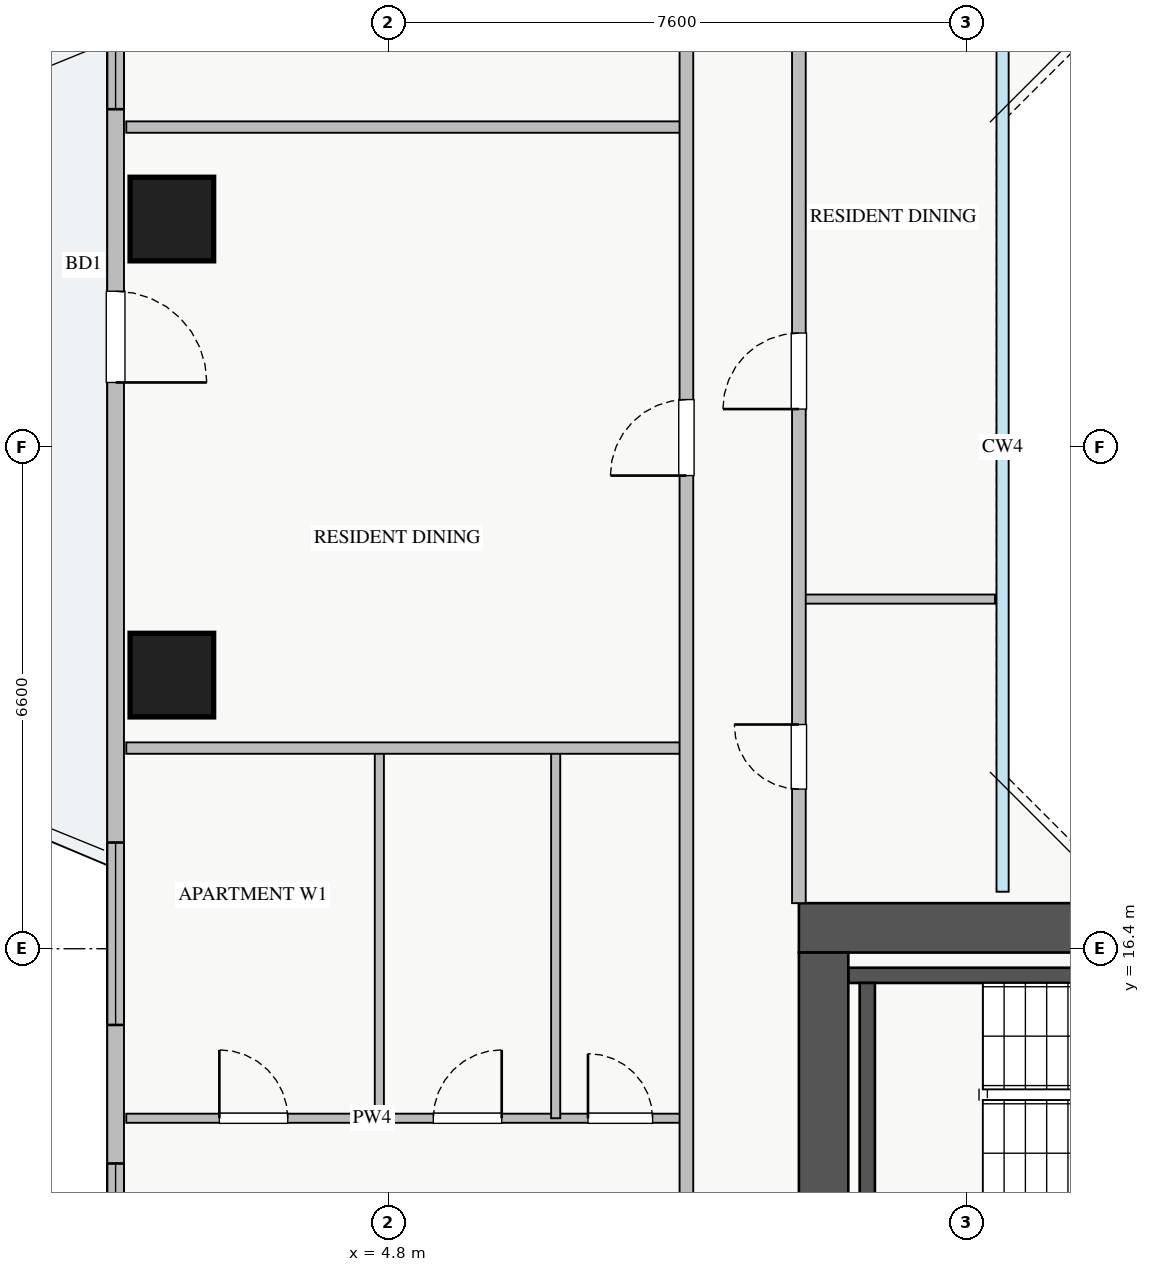
"""IFC4 building model, lengths in metres.
Left out: names, types, materials, properties, quantities, classifications, styles, units other than length and angle.
Written with IfcOpenShell. Run it as: python <this file> out.ifc"""

import sys

from ifc_helpers import new_model, si_unit, direction, frame, frame_2d, origin, origin_2d, place, context, subcontext, project, spatial, rectangle, extrude, source, transform, mapped, element, fill, save


model = new_model("IFC4")
c1 = context("Model", 3, precision=1e-05, world=origin(), true_north=direction((0.0, 1.0)))
c2 = subcontext(c1, "Body", "Model", "MODEL_VIEW")
j1 = project(units=[si_unit("LENGTHUNIT", "METRE"), si_unit("PLANEANGLEUNIT", "RADIAN")], contexts=[c1])
p1 = place(None, origin())
s1 = spatial("IfcSite", under=j1, at=p1, CompositionType="ELEMENT")
p2 = place(p1, origin())
s2 = spatial("IfcBuilding", under=s1, at=p2, CompositionType="ELEMENT")
p3 = place(p2, frame((0.0, 0.0, 126.25)))
s3 = spatial("IfcBuildingStorey", under=s2, at=p3, CompositionType="ELEMENT", Elevation=126.25)
p4 = place(p3, frame((10.85, 16.05, 0.0), z_axis=(0.0, 0.0, 1.0), x_axis=(1.0, 0.0, 0.0)))
e1 = element("IfcWall", 1, at=p4, inside=s3, PredefinedType="SHEAR", context=c2, shape_type="SweptSolid", body=[
    extrude(rectangle(XDim=7.3, YDim=0.2, at=frame_2d((3.65, 0.0))), origin(), (0.0, 0.0, 1.0), 3.25),
])
p5 = place(p3, frame((11.1, 13.01, 0.0), z_axis=(0.0, 0.0, 1.0), x_axis=(0.0, 1.0, 0.0)))
e2 = element("IfcWall", 2, at=p5, inside=s3, PredefinedType="SHEAR", context=c2, shape_type="SweptSolid", body=[
    extrude(rectangle(XDim=2.94, YDim=0.2, at=frame_2d((1.47, 0.0))), origin(), (0.0, 0.0, 1.0), 3.25),
])
p6 = place(p3, frame((10.2, 16.675, 0.0), z_axis=(0.0, 0.0, 1.0), x_axis=(1.0, 0.0, 0.0)))
e3 = element("IfcWall", 3, at=p6, inside=s3, PredefinedType="SHEAR", context=c2, shape_type="SweptSolid", body=[
    extrude(rectangle(XDim=17.6, YDim=0.65, at=frame_2d((8.8, 0.0))), origin(), (0.0, 0.0, 1.0), 3.25),
])
p7 = place(p3, frame((10.525, 10.45, 0.0), z_axis=(0.0, 0.0, 1.0), x_axis=(0.0, 1.0, 0.0)))
e4 = element("IfcWall", 4, at=p7, inside=s3, PredefinedType="SHEAR", context=c2, shape_type="SweptSolid", body=[
    extrude(rectangle(XDim=5.9, YDim=0.65, at=frame_2d((2.95, 0.0))), origin(), (0.0, 0.0, 1.0), 3.25),
])
m1 = source(origin(), c2, "Body", "SweptSolid", [
    extrude(rectangle(XDim=1.1, YDim=1.1, at=origin_2d()), origin(), (0.0, 0.0, 1.0), 3.25),
])
for number, where, z_axis, x_axis in (
    (5, (1.95, 26.0, 0.0), (0.0, 0.0, 1.0), (1.0, 0.0, 0.0)),
    (6, (1.95, 20.0, 0.0), (0.0, 0.0, 1.0), (1.0, 0.0, 0.0)),
):
    element("IfcColumn", number, at=place(p3, frame(where, z_axis=z_axis, x_axis=x_axis)), inside=s3, PredefinedType="COLUMN", context=c2, shape_type="MappedRepresentation", body=[
        mapped(m1, transform((0.0, 0.0, 0.0), x_axis=(1.0, 0.0, 0.0), y_axis=(0.0, 1.0, 0.0), z_axis=(0.0, 0.0, 1.0), scale=1.0)),
    ])
p8 = place(p3, frame((1.21, 10.55, 0.0), z_axis=(0.0, 0.0, 1.0), x_axis=(0.0, 1.0, 0.0)))
e7 = element("IfcWall", 7, at=p8, inside=s3, PredefinedType="STANDARD", context=c2, shape_type="SweptSolid", body=[
    extrude(rectangle(XDim=24.9, YDim=0.22, at=frame_2d((12.45, 0.0))), origin(), (0.0, 0.0, 1.0), 2.61),
])
p9 = place(p8, frame((13.3, 0.0, 0.0)))
e8 = element("IfcOpeningElement", 8, at=p9, cuts=e7, PredefinedType="OPENING", context=c2, shape_type="SweptSolid", body=[
    extrude(rectangle(XDim=1.2, YDim=2.1, at=frame_2d((0.6, 1.05))), frame((0.0, 0.12, 0.0), z_axis=(0.0, -1.0, 0.0), x_axis=(1.0, 0.0, 0.0)), (0.0, 0.0, 1.0), 0.24),
])
p10 = place(p8, frame((0.625, 0.0, 0.9)))
e9 = element("IfcOpeningElement", 9, at=p10, cuts=e7, PredefinedType="OPENING", context=c2, shape_type="SweptSolid", body=[
    extrude(rectangle(XDim=2.4, YDim=1.5, at=frame_2d((1.2, 0.75))), frame((0.0, 0.12, 0.0), z_axis=(0.0, -1.0, 0.0), x_axis=(1.0, 0.0, 0.0)), (0.0, 0.0, 1.0), 0.24),
])
p11 = place(p8, frame((21.82, 0.0, 0.9)))
e10 = element("IfcOpeningElement", 10, at=p11, cuts=e7, PredefinedType="OPENING", context=c2, shape_type="SweptSolid", body=[
    extrude(rectangle(XDim=2.1, YDim=1.5, at=frame_2d((1.05, 0.75))), frame((0.0, 0.12, 0.0), z_axis=(0.0, -1.0, 0.0), x_axis=(1.0, 0.0, 0.0)), (0.0, 0.0, 1.0), 0.24),
])
p12 = place(p8, frame((4.847, 0.0, 0.9)))
e11 = element("IfcOpeningElement", 11, at=p12, cuts=e7, PredefinedType="OPENING", context=c2, shape_type="SweptSolid", body=[
    extrude(rectangle(XDim=2.4, YDim=1.5, at=frame_2d((1.2, 0.75))), frame((0.0, 0.12, 0.0), z_axis=(0.0, -1.0, 0.0), x_axis=(1.0, 0.0, 0.0)), (0.0, 0.0, 1.0), 0.24),
])
p13 = place(p8, frame((16.895, 0.0, 0.9)))
e12 = element("IfcOpeningElement", 12, at=p13, cuts=e7, PredefinedType="OPENING", context=c2, shape_type="SweptSolid", body=[
    extrude(rectangle(XDim=0.9, YDim=1.2, at=frame_2d((0.45, 0.6))), frame((0.0, 0.12, 0.0), z_axis=(0.0, -1.0, 0.0), x_axis=(1.0, 0.0, 0.0)), (0.0, 0.0, 1.0), 0.24),
])
p14 = place(p3, frame((1.35, 14.17, 0.0), z_axis=(0.0, 0.0, 1.0), x_axis=(1.0, 0.0, 0.0)))
e13 = element("IfcWall", 13, at=p14, inside=s3, PredefinedType="PLUMBINGWALL", context=c2, shape_type="SweptSolid", body=[
    extrude(rectangle(XDim=7.37, YDim=0.12, at=frame_2d((3.685, 0.0))), origin(), (0.0, 0.0, 1.0), 3.07),
])
p15 = place(p14, frame((1.225, 0.0, 0.0)))
e14 = element("IfcOpeningElement", 14, at=p15, cuts=e13, PredefinedType="OPENING", context=c2, shape_type="SweptSolid", body=[
    extrude(rectangle(XDim=0.9, YDim=2.05, at=frame_2d((0.45, 1.025))), frame((0.0, 0.07, 0.0), z_axis=(0.0, -1.0, 0.0), x_axis=(1.0, 0.0, 0.0)), (0.0, 0.0, 1.0), 0.14),
])
p16 = place(p14, frame((4.04, 0.0, 0.0)))
e15 = element("IfcOpeningElement", 15, at=p16, cuts=e13, PredefinedType="OPENING", context=c2, shape_type="SweptSolid", body=[
    extrude(rectangle(XDim=0.9, YDim=2.05, at=frame_2d((0.45, 1.025))), frame((0.0, 0.07, 0.0), z_axis=(0.0, -1.0, 0.0), x_axis=(1.0, 0.0, 0.0)), (0.0, 0.0, 1.0), 0.14),
])
p17 = place(p14, frame((6.075, 0.0, 0.0)))
e16 = element("IfcOpeningElement", 16, at=p17, cuts=e13, PredefinedType="OPENING", context=c2, shape_type="SweptSolid", body=[
    extrude(rectangle(XDim=0.85, YDim=2.05, at=frame_2d((0.425, 1.025))), frame((0.0, 0.07, 0.0), z_axis=(0.0, -1.0, 0.0), x_axis=(1.0, 0.0, 0.0)), (0.0, 0.0, 1.0), 0.14),
])
for number, where, z_axis, x_axis in (
    (17, (4.68, 14.17, 0.0), (0.0, 0.0, 1.0), (0.0, 1.0, 0.0)),
    (18, (7.0, 14.17, 0.0), (0.0, 0.0, 1.0), (0.0, 1.0, 0.0)),
):
    element("IfcWall", number, at=place(p3, frame(where, z_axis=z_axis, x_axis=x_axis)), inside=s3, PredefinedType="PLUMBINGWALL", context=c2, shape_type="SweptSolid", body=[
        extrude(rectangle(XDim=4.87, YDim=0.12, at=frame_2d((2.435, 0.0))), origin(), (0.0, 0.0, 1.0), 3.07),
    ])
for number, where, z_axis, x_axis in (
    (19, (1.35, 19.04, 0.0), (0.0, 0.0, 1.0), (1.0, 0.0, 0.0)),
    (20, (1.35, 27.21, 0.0), (0.0, 0.0, 1.0), (1.0, 0.0, 0.0)),
):
    element("IfcWall", number, at=place(p3, frame(where, z_axis=z_axis, x_axis=x_axis)), inside=s3, PredefinedType="PARTITIONING", context=c2, shape_type="SweptSolid", body=[
        extrude(rectangle(XDim=7.37, YDim=0.15, at=frame_2d((3.685, 0.0))), origin(), (0.0, 0.0, 1.0), 3.07),
    ])
p18 = place(p3, frame((8.72, 8.31, 0.0), z_axis=(0.0, 0.0, 1.0), x_axis=(0.0, 1.0, 0.0)))
e21 = element("IfcWall", 21, at=p18, inside=s3, PredefinedType="PARTITIONING", context=c2, shape_type="SweptSolid", body=[
    extrude(rectangle(XDim=29.37, YDim=0.18, at=frame_2d((14.685, 0.0))), origin(), (0.0, 0.0, 1.0), 3.07),
])
p19 = place(p18, frame((28.06, 0.0, 0.0)))
e22 = element("IfcOpeningElement", 22, at=p19, cuts=e21, PredefinedType="OPENING", context=c2, shape_type="SweptSolid", body=[
    extrude(rectangle(XDim=0.9, YDim=2.05, at=frame_2d((0.45, 1.025))), frame((0.0, 0.1, 0.0), z_axis=(0.0, -1.0, 0.0), x_axis=(1.0, 0.0, 0.0)), (0.0, 0.0, 1.0), 0.2),
])
p20 = place(p18, frame((0.24, 0.0, 0.0)))
e23 = element("IfcOpeningElement", 23, at=p20, cuts=e21, PredefinedType="OPENING", context=c2, shape_type="SweptSolid", body=[
    extrude(rectangle(XDim=0.9, YDim=2.05, at=frame_2d((0.45, 1.025))), frame((0.0, 0.1, 0.0), z_axis=(0.0, -1.0, 0.0), x_axis=(1.0, 0.0, 0.0)), (0.0, 0.0, 1.0), 0.2),
])
p21 = place(p18, frame((2.92, 0.0, 0.0)))
e24 = element("IfcOpeningElement", 24, at=p21, cuts=e21, PredefinedType="OPENING", context=c2, shape_type="SweptSolid", body=[
    extrude(rectangle(XDim=1.0, YDim=2.05, at=frame_2d((0.5, 1.025))), frame((0.0, 0.1, 0.0), z_axis=(0.0, -1.0, 0.0), x_axis=(1.0, 0.0, 0.0)), (0.0, 0.0, 1.0), 0.2),
])
p22 = place(p18, frame((14.315, 0.0, 0.0)))
e25 = element("IfcOpeningElement", 25, at=p22, cuts=e21, PredefinedType="OPENING", context=c2, shape_type="SweptSolid", body=[
    extrude(rectangle(XDim=1.0, YDim=2.05, at=frame_2d((0.5, 1.025))), frame((0.0, 0.1, 0.0), z_axis=(0.0, -1.0, 0.0), x_axis=(1.0, 0.0, 0.0)), (0.0, 0.0, 1.0), 0.2),
])
p23 = place(p18, frame((20.315, 0.0, 0.0)))
e26 = element("IfcOpeningElement", 26, at=p23, cuts=e21, PredefinedType="OPENING", context=c2, shape_type="SweptSolid", body=[
    extrude(rectangle(XDim=1.0, YDim=2.05, at=frame_2d((0.5, 1.025))), frame((0.0, 0.1, 0.0), z_axis=(0.0, -1.0, 0.0), x_axis=(1.0, 0.0, 0.0)), (0.0, 0.0, 1.0), 0.2),
])
p24 = place(p3, frame((10.2, 21.0, 0.0), z_axis=(0.0, 0.0, 1.0), x_axis=(1.0, 0.0, 0.0)))
e27 = element("IfcWall", 27, at=p24, inside=s3, PredefinedType="PLUMBINGWALL", context=c2, shape_type="SweptSolid", body=[
    extrude(rectangle(XDim=2.58, YDim=0.12, at=frame_2d((1.29, 0.0))), origin(), (0.0, 0.0, 1.0), 3.07),
])
p25 = place(p3, frame((10.2, 17.0, 0.0), z_axis=(0.0, 0.0, 1.0), x_axis=(0.0, 1.0, 0.0)))
e28 = element("IfcWall", 28, at=p25, inside=s3, PredefinedType="PARTITIONING", context=c2, shape_type="SweptSolid", body=[
    extrude(rectangle(XDim=12.0, YDim=0.18, at=frame_2d((6.0, 0.0))), origin(), (0.0, 0.0, 1.0), 3.07),
])
p26 = place(p25, frame((1.5, 0.0, 0.0)))
e29 = element("IfcOpeningElement", 29, at=p26, cuts=e28, PredefinedType="OPENING", context=c2, shape_type="SweptSolid", body=[
    extrude(rectangle(XDim=0.85, YDim=2.05, at=frame_2d((0.425, 1.025))), frame((0.0, 0.1, 0.0), z_axis=(0.0, -1.0, 0.0), x_axis=(1.0, 0.0, 0.0)), (0.0, 0.0, 1.0), 0.2),
])
p27 = place(p25, frame((6.5, 0.0, 0.0)))
e30 = element("IfcOpeningElement", 30, at=p27, cuts=e28, PredefinedType="OPENING", context=c2, shape_type="SweptSolid", body=[
    extrude(rectangle(XDim=1.0, YDim=2.05, at=frame_2d((0.5, 1.025))), frame((0.0, 0.1, 0.0), z_axis=(0.0, -1.0, 0.0), x_axis=(1.0, 0.0, 0.0)), (0.0, 0.0, 1.0), 0.2),
])
m2 = source(origin(), c2, "Body", "SweptSolid", [
    extrude(rectangle(XDim=1.2, YDim=2.1, at=frame_2d((0.6, 1.05))), frame((0.0, 0.025, 0.0), z_axis=(0.0, -1.0, 0.0), x_axis=(1.0, 0.0, 0.0)), (0.0, 0.0, 1.0), 0.05),
])
p28 = place(p9, frame((1.2, 0.0, 0.0), z_axis=(0.0, 0.0, 1.0), x_axis=(-1.0, 0.0, 0.0)))
e31 = element("IfcDoor", 31, at=p28, inside=s3, OperationType="SINGLE_SWING_LEFT", PredefinedType="DOOR", context=c2, shape_type="MappedRepresentation", body=[
    mapped(m2, transform((0.0, 0.0, 0.0), x_axis=(1.0, 0.0, 0.0), y_axis=(0.0, 1.0, 0.0), z_axis=(0.0, 0.0, 1.0), scale=1.0)),
])
fill(e8, e31)
m3 = source(origin(), c2, "Body", "SweptSolid", [
    extrude(rectangle(XDim=2.4, YDim=1.5, at=frame_2d((1.2, 0.75))), frame((0.0, 0.03, 0.0), z_axis=(0.0, -1.0, 0.0), x_axis=(1.0, 0.0, 0.0)), (0.0, 0.0, 1.0), 0.06),
])
p29 = place(p10, origin())
e32 = element("IfcWindow", 32, at=p29, inside=s3, PartitioningType="TRIPLE_PANEL_VERTICAL", PredefinedType="WINDOW", context=c2, shape_type="MappedRepresentation", body=[
    mapped(m3, transform((0.0, 0.0, 0.0), x_axis=(1.0, 0.0, 0.0), y_axis=(0.0, 1.0, 0.0), z_axis=(0.0, 0.0, 1.0), scale=1.0)),
])
fill(e9, e32)
m4 = source(origin(), c2, "Body", "SweptSolid", [
    extrude(rectangle(XDim=0.9, YDim=2.05, at=frame_2d((0.45, 1.025))), frame((0.0, 0.025, 0.0), z_axis=(0.0, -1.0, 0.0), x_axis=(1.0, 0.0, 0.0)), (0.0, 0.0, 1.0), 0.05),
])
p30 = place(p15, origin())
e33 = element("IfcDoor", 33, at=p30, inside=s3, OperationType="SINGLE_SWING_LEFT", PredefinedType="DOOR", context=c2, shape_type="MappedRepresentation", body=[
    mapped(m4, transform((0.0, 0.0, 0.0), x_axis=(1.0, 0.0, 0.0), y_axis=(0.0, 1.0, 0.0), z_axis=(0.0, 0.0, 1.0), scale=1.0)),
])
fill(e14, e33)
p31 = place(p16, origin())
e34 = element("IfcDoor", 34, at=p31, inside=s3, OperationType="SINGLE_SWING_RIGHT", PredefinedType="DOOR", context=c2, shape_type="MappedRepresentation", body=[
    mapped(m4, transform((0.0, 0.0, 0.0), x_axis=(1.0, 0.0, 0.0), y_axis=(0.0, 1.0, 0.0), z_axis=(0.0, 0.0, 1.0), scale=1.0)),
])
fill(e15, e34)
m5 = source(origin(), c2, "Body", "SweptSolid", [
    extrude(rectangle(XDim=0.85, YDim=2.05, at=frame_2d((0.425, 1.025))), frame((0.0, 0.025, 0.0), z_axis=(0.0, -1.0, 0.0), x_axis=(1.0, 0.0, 0.0)), (0.0, 0.0, 1.0), 0.05),
])
p32 = place(p17, origin())
e35 = element("IfcDoor", 35, at=p32, inside=s3, OperationType="SINGLE_SWING_LEFT", PredefinedType="DOOR", context=c2, shape_type="MappedRepresentation", body=[
    mapped(m5, transform((0.0, 0.0, 0.0), x_axis=(1.0, 0.0, 0.0), y_axis=(0.0, 1.0, 0.0), z_axis=(0.0, 0.0, 1.0), scale=1.0)),
])
fill(e16, e35)
m6 = source(origin(), c2, "Body", "SweptSolid", [
    extrude(rectangle(XDim=1.0, YDim=2.05, at=frame_2d((0.5, 1.025))), frame((0.0, 0.025, 0.0), z_axis=(0.0, -1.0, 0.0), x_axis=(1.0, 0.0, 0.0)), (0.0, 0.0, 1.0), 0.05),
])
p33 = place(p22, origin())
e36 = element("IfcDoor", 36, at=p33, inside=s3, OperationType="SINGLE_SWING_LEFT", PredefinedType="DOOR", context=c2, shape_type="MappedRepresentation", body=[
    mapped(m6, transform((0.0, 0.0, 0.0), x_axis=(1.0, 0.0, 0.0), y_axis=(0.0, 1.0, 0.0), z_axis=(0.0, 0.0, 1.0), scale=1.0)),
])
fill(e25, e36)
p34 = place(p26, origin())
e37 = element("IfcDoor", 37, at=p34, inside=s3, OperationType="SINGLE_SWING_RIGHT", PredefinedType="DOOR", context=c2, shape_type="MappedRepresentation", body=[
    mapped(m5, transform((0.0, 0.0, 0.0), x_axis=(1.0, 0.0, 0.0), y_axis=(0.0, 1.0, 0.0), z_axis=(0.0, 0.0, 1.0), scale=1.0)),
])
fill(e29, e37)
p35 = place(p27, origin())
e38 = element("IfcDoor", 38, at=p35, inside=s3, OperationType="SINGLE_SWING_LEFT", PredefinedType="DOOR", context=c2, shape_type="MappedRepresentation", body=[
    mapped(m6, transform((0.0, 0.0, 0.0), x_axis=(1.0, 0.0, 0.0), y_axis=(0.0, 1.0, 0.0), z_axis=(0.0, 0.0, 1.0), scale=1.0)),
])
fill(e30, e38)
p36 = place(p12, origin())
e39 = element("IfcWindow", 39, at=p36, inside=s3, PartitioningType="TRIPLE_PANEL_VERTICAL", PredefinedType="WINDOW", context=c2, shape_type="MappedRepresentation", body=[
    mapped(m3, transform((0.0, 0.0, 0.0), x_axis=(1.0, 0.0, 0.0), y_axis=(0.0, 1.0, 0.0), z_axis=(0.0, 0.0, 1.0), scale=1.0)),
])
fill(e11, e39)
m7 = source(origin(), c2, "Body", "SweptSolid", [
    extrude(rectangle(XDim=0.9, YDim=1.2, at=frame_2d((0.45, 0.6))), frame((0.0, 0.03, 0.0), z_axis=(0.0, -1.0, 0.0), x_axis=(1.0, 0.0, 0.0)), (0.0, 0.0, 1.0), 0.06),
])
p37 = place(p13, origin())
e40 = element("IfcWindow", 40, at=p37, inside=s3, PartitioningType="SINGLE_PANEL", PredefinedType="WINDOW", context=c2, shape_type="MappedRepresentation", body=[
    mapped(m7, transform((0.0, 0.0, 0.0), x_axis=(1.0, 0.0, 0.0), y_axis=(0.0, 1.0, 0.0), z_axis=(0.0, 0.0, 1.0), scale=1.0)),
])
fill(e12, e40)
save(model, sys.argv[1])
